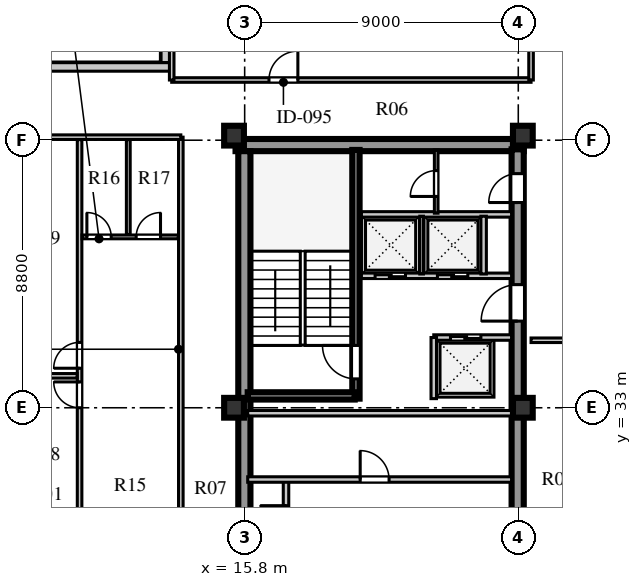
"""IFC4 building model, lengths in metres.
Left out: names, types, materials, properties, quantities, classifications, styles, units other than length and angle.
Written with IfcOpenShell. Run it as: python <this file> out.ifc"""

import sys

from ifc_helpers import new_model, si_unit, direction, frame, frame_2d, origin, origin_2d, place, context, subcontext, project, spatial, rectangle, extrude, element, fill, save


model = new_model("IFC4")
c1 = context("Model", 3, precision=1e-05, world=origin(), true_north=direction((0.0, 1.0)))
c2 = subcontext(c1, "Body", "Model", "MODEL_VIEW")
j1 = project(units=[si_unit("LENGTHUNIT", "METRE"), si_unit("PLANEANGLEUNIT", "RADIAN")], contexts=[c1])
p1 = place(None, origin())
s1 = spatial("IfcSite", under=j1, at=p1, CompositionType="ELEMENT")
p2 = place(p1, origin())
s2 = spatial("IfcBuilding", under=s1, at=p2, CompositionType="ELEMENT")
p3 = place(p2, frame((0.0, 0.0, 237.5)))
s3 = spatial("IfcBuildingStorey", under=s2, at=p3, CompositionType="ELEMENT", Elevation=237.5)
p4 = place(p3, frame((15.5, 41.64, 0.0), z_axis=(0.0, 0.0, 1.0), x_axis=(1.0, 0.0, 0.0)))
e1 = element("IfcWall", 1, at=p4, inside=s3, PredefinedType="SHEAR", context=c2, shape_type="SweptSolid", body=[
    extrude(rectangle(XDim=9.48, YDim=0.4, at=frame_2d((4.74, 0.0))), origin(), (0.0, 0.0, 1.0), 3.66),
])
p5 = place(p3, frame((15.79, 15.81, 0.0), z_axis=(0.0, 0.0, 1.0), x_axis=(0.0, 1.0, 0.0)))
e2 = element("IfcWall", 2, at=p5, inside=s3, PredefinedType="SHEAR", context=c2, shape_type="SweptSolid", body=[
    extrude(rectangle(XDim=25.63, YDim=0.4, at=frame_2d((12.815, 0.0))), origin(), (0.0, 0.0, 1.0), 3.66),
])
p6 = place(p3, frame((24.78, 15.74, 0.0), z_axis=(0.0, 0.0, 1.0), x_axis=(0.0, 1.0, 0.0)))
e3 = element("IfcWall", 3, at=p6, inside=s3, PredefinedType="SHEAR", context=c2, shape_type="SweptSolid", body=[
    extrude(rectangle(XDim=25.76, YDim=0.4, at=frame_2d((12.88, 0.0))), origin(), (0.0, 0.0, 1.0), 3.66),
])
p7 = place(p6, frame((1.61, 0.0, 0.0)))
e4 = element("IfcOpeningElement", 4, at=p7, cuts=e3, PredefinedType="OPENING", context=c2, shape_type="SweptSolid", body=[
    extrude(rectangle(XDim=1.2, YDim=2.1, at=frame_2d((0.6, 1.05))), frame((0.0, 0.21, 0.0), z_axis=(0.0, -1.0, 0.0), x_axis=(1.0, 0.0, 0.0)), (0.0, 0.0, 1.0), 0.42),
])
p8 = place(p6, frame((6.78, 0.0, 0.0)))
e5 = element("IfcOpeningElement", 5, at=p8, cuts=e3, PredefinedType="OPENING", context=c2, shape_type="SweptSolid", body=[
    extrude(rectangle(XDim=0.85, YDim=2.06, at=frame_2d((0.425, 1.03))), frame((0.0, 0.21, 0.0), z_axis=(0.0, -1.0, 0.0), x_axis=(1.0, 0.0, 0.0)), (0.0, 0.0, 1.0), 0.42),
])
p9 = place(p6, frame((12.11, 0.0, 0.0)))
e6 = element("IfcOpeningElement", 6, at=p9, cuts=e3, PredefinedType="OPENING", context=c2, shape_type="SweptSolid", body=[
    extrude(rectangle(XDim=1.5, YDim=2.12, at=frame_2d((0.75, 1.06))), frame((0.0, 0.21, 0.0), z_axis=(0.0, -1.0, 0.0), x_axis=(1.0, 0.0, 0.0)), (0.0, 0.0, 1.0), 0.42),
])
p10 = place(p6, frame((20.11, 0.0, 0.0)))
e7 = element("IfcOpeningElement", 7, at=p10, cuts=e3, PredefinedType="OPENING", context=c2, shape_type="SweptSolid", body=[
    extrude(rectangle(XDim=1.2, YDim=2.12, at=frame_2d((0.6, 1.06))), frame((0.0, 0.21, 0.0), z_axis=(0.0, -1.0, 0.0), x_axis=(1.0, 0.0, 0.0)), (0.0, 0.0, 1.0), 0.42),
])
p11 = place(p6, frame((24.01, 0.0, 0.0)))
e8 = element("IfcOpeningElement", 8, at=p11, cuts=e3, PredefinedType="OPENING", context=c2, shape_type="SweptSolid", body=[
    extrude(rectangle(XDim=0.95, YDim=2.1, at=frame_2d((0.475, 1.05))), frame((0.0, 0.21, 0.0), z_axis=(0.0, -1.0, 0.0), x_axis=(1.0, 0.0, 0.0)), (0.0, 0.0, 1.0), 0.42),
])
for number, where, z_axis, x_axis in (
    (9, (15.45, 33.0, 0.0), (0.0, 0.0, 1.0), (1.0, 0.0, 0.0)),
    (10, (15.45, 41.95, 0.0), (0.0, 0.0, 1.0), (1.0, 0.0, 0.0)),
    (11, (24.95, 33.0, 0.0), (0.0, 0.0, 1.0), (1.0, 0.0, 0.0)),
    (12, (24.95, 41.95, 0.0), (0.0, 0.0, 1.0), (1.0, 0.0, 0.0)),
):
    element("IfcColumn", number, at=place(p3, frame(where, z_axis=z_axis, x_axis=x_axis)), inside=s3, PredefinedType="COLUMN", context=c2, shape_type="SweptSolid", body=[
        extrude(rectangle(XDim=0.65, YDim=0.65, at=origin_2d()), origin(), (0.0, 0.0, 1.0), 3.66),
    ])
p12 = place(p3, frame((13.19, 49.32, 0.0), z_axis=(0.0, 0.0, 1.0), x_axis=(0.0, -1.0, 0.0)))
e13 = element("IfcWall", 13, at=p12, inside=s3, PredefinedType="STANDARD", context=c2, shape_type="SweptSolid", body=[
    extrude(rectangle(XDim=4.97, YDim=0.28, at=frame_2d((2.485, 0.0))), origin(), (0.0, 0.0, 1.0), 3.66),
])
p13 = place(p3, frame((13.33, 44.21, 0.0), z_axis=(0.0, 0.0, 1.0), x_axis=(-1.0, 0.0, 0.0)))
e14 = element("IfcWall", 14, at=p13, inside=s3, PredefinedType="STANDARD", context=c2, shape_type="SweptSolid", body=[
    extrude(rectangle(XDim=5.53, YDim=0.28, at=frame_2d((2.765, 0.0))), origin(), (0.0, 0.0, 1.0), 3.66),
])
p14 = place(p3, frame((17.16, 26.58, 0.0), z_axis=(0.0, 0.0, 1.0), x_axis=(0.0, 1.0, 0.0)))
e15 = element("IfcWall", 15, at=p14, inside=s3, PredefinedType="SOLIDWALL", context=c2, shape_type="SweptSolid", body=[
    extrude(rectangle(XDim=4.02, YDim=0.18, at=frame_2d((2.01, 0.0))), origin(), (0.0, 0.0, 1.0), 3.66),
])
p15 = place(p14, frame((2.35, 0.0, 0.0)))
e16 = element("IfcOpeningElement", 16, at=p15, cuts=e15, PredefinedType="OPENING", context=c2, shape_type="SweptSolid", body=[
    extrude(rectangle(XDim=0.85, YDim=2.06, at=frame_2d((0.425, 1.03))), frame((0.0, 0.1, 0.0), z_axis=(0.0, -1.0, 0.0), x_axis=(1.0, 0.0, 0.0)), (0.0, 0.0, 1.0), 0.2),
])
p16 = place(p3, frame((15.9, 30.64, 0.0), z_axis=(0.0, 0.0, 1.0), x_axis=(1.0, 0.0, 0.0)))
e17 = element("IfcWall", 17, at=p16, inside=s3, PredefinedType="SOLIDWALL", context=c2, shape_type="SweptSolid", body=[
    extrude(rectangle(XDim=8.68, YDim=0.18, at=frame_2d((4.34, 0.0))), origin(), (0.0, 0.0, 1.0), 3.66),
])
p17 = place(p16, frame((3.7, 0.0, 0.0)))
e18 = element("IfcOpeningElement", 18, at=p17, cuts=e17, PredefinedType="OPENING", context=c2, shape_type="SweptSolid", body=[
    extrude(rectangle(XDim=0.95, YDim=2.1, at=frame_2d((0.475, 1.05))), frame((0.0, 0.1, 0.0), z_axis=(0.0, -1.0, 0.0), x_axis=(1.0, 0.0, 0.0)), (0.0, 0.0, 1.0), 0.2),
])
p18 = place(p3, frame((15.9, 32.82, 0.0), z_axis=(0.0, 0.0, 1.0), x_axis=(1.0, 0.0, 0.0)))
e19 = element("IfcWall", 19, at=p18, inside=s3, PredefinedType="SOLIDWALL", context=c2, shape_type="SweptSolid", body=[
    extrude(rectangle(XDim=8.68, YDim=0.18, at=frame_2d((4.34, 0.0))), origin(), (0.0, 0.0, 1.0), 3.06),
])
p19 = place(p3, frame((19.46, 33.3, 0.0), z_axis=(0.0, 0.0, 1.0), x_axis=(0.0, 1.0, 0.0)))
e20 = element("IfcWall", 20, at=p19, inside=s3, PredefinedType="SHEAR", context=c2, shape_type="SweptSolid", body=[
    extrude(rectangle(XDim=8.18, YDim=0.24, at=frame_2d((4.09, 0.0))), origin(), (0.0, 0.0, 1.0), 3.9),
])
p20 = place(p19, frame((0.65, 0.0, 0.0)))
e21 = element("IfcOpeningElement", 21, at=p20, cuts=e20, PredefinedType="OPENING", context=c2, shape_type="SweptSolid", body=[
    extrude(rectangle(XDim=1.1, YDim=2.1, at=frame_2d((0.55, 1.05))), frame((0.0, 0.13, 0.0), z_axis=(0.0, -1.0, 0.0), x_axis=(1.0, 0.0, 0.0)), (0.0, 0.0, 1.0), 0.26),
])
p21 = place(p3, frame((15.9, 33.39, 0.0), z_axis=(0.0, 0.0, 1.0), x_axis=(1.0, 0.0, 0.0)))
e22 = element("IfcWall", 22, at=p21, inside=s3, PredefinedType="SHEAR", context=c2, shape_type="SweptSolid", body=[
    extrude(rectangle(XDim=3.52, YDim=0.24, at=frame_2d((1.76, 0.0))), origin(), (0.0, 0.0, 1.0), 3.9),
])
p22 = place(p3, frame((22.02, 35.31, 0.0), z_axis=(0.0, 0.0, 1.0), x_axis=(1.0, 0.0, 0.0)))
e23 = element("IfcWall", 23, at=p22, inside=s3, PredefinedType="SOLIDWALL", context=c2, shape_type="SweptSolid", body=[
    extrude(rectangle(XDim=2.56, YDim=0.18, at=frame_2d((1.28, 0.0))), origin(), (0.0, 0.0, 1.0), 3.66),
])
p23 = place(p22, frame((0.55, 0.0, 0.0)))
e24 = element("IfcOpeningElement", 24, at=p23, cuts=e23, PredefinedType="OPENING", context=c2, shape_type="SweptSolid", body=[
    extrude(rectangle(XDim=1.0, YDim=2.1, at=frame_2d((0.5, 1.05))), frame((0.0, 0.1, 0.0), z_axis=(0.0, -1.0, 0.0), x_axis=(1.0, 0.0, 0.0)), (0.0, 0.0, 1.0), 0.2),
])
p24 = place(p3, frame((22.02, 33.3, 0.0), z_axis=(0.0, 0.0, 1.0), x_axis=(0.0, 1.0, 0.0)))
e25 = element("IfcWall", 25, at=p24, inside=s3, PredefinedType="SOLIDWALL", context=c2, shape_type="SweptSolid", body=[
    extrude(rectangle(XDim=2.01, YDim=0.18, at=frame_2d((1.005, 0.0))), origin(), (0.0, 0.0, 1.0), 3.66),
])
p25 = place(p3, frame((19.64, 37.34, 0.0), z_axis=(0.0, 0.0, 1.0), x_axis=(1.0, 0.0, 0.0)))
e26 = element("IfcWall", 26, at=p25, inside=s3, PredefinedType="SOLIDWALL", context=c2, shape_type="SweptSolid", body=[
    extrude(rectangle(XDim=4.94, YDim=0.18, at=frame_2d((2.47, 0.0))), origin(), (0.0, 0.0, 1.0), 3.66),
])
p26 = place(p25, frame((0.45, 0.0, 0.0)))
e27 = element("IfcOpeningElement", 27, at=p26, cuts=e26, PredefinedType="OPENING", context=c2, shape_type="SweptSolid", body=[
    extrude(rectangle(XDim=1.0, YDim=2.1, at=frame_2d((0.5, 1.05))), frame((0.0, 0.1, 0.0), z_axis=(0.0, -1.0, 0.0), x_axis=(1.0, 0.0, 0.0)), (0.0, 0.0, 1.0), 0.2),
])
p27 = place(p25, frame((2.5, 0.0, 0.0)))
e28 = element("IfcOpeningElement", 28, at=p27, cuts=e26, PredefinedType="OPENING", context=c2, shape_type="SweptSolid", body=[
    extrude(rectangle(XDim=1.0, YDim=2.1, at=frame_2d((0.5, 1.05))), frame((0.0, 0.1, 0.0), z_axis=(0.0, -1.0, 0.0), x_axis=(1.0, 0.0, 0.0)), (0.0, 0.0, 1.0), 0.2),
])
p28 = place(p3, frame((19.64, 39.36, 0.0), z_axis=(0.0, 0.0, 1.0), x_axis=(1.0, 0.0, 0.0)))
e29 = element("IfcWall", 29, at=p28, inside=s3, PredefinedType="SOLIDWALL", context=c2, shape_type="SweptSolid", body=[
    extrude(rectangle(XDim=4.94, YDim=0.18, at=frame_2d((2.47, 0.0))), origin(), (0.0, 0.0, 1.0), 3.66),
])
p29 = place(p3, frame((21.62, 37.4, 0.0), z_axis=(0.0, 0.0, 1.0), x_axis=(0.0, 1.0, 0.0)))
e30 = element("IfcWall", 30, at=p29, inside=s3, PredefinedType="PARTITIONING", context=c2, shape_type="SweptSolid", body=[
    extrude(rectangle(XDim=1.9, YDim=0.12, at=frame_2d((0.95, 0.0))), origin(), (0.0, 0.0, 1.0), 3.66),
])
p30 = place(p3, frame((23.66, 37.4, 0.0), z_axis=(0.0, 0.0, 1.0), x_axis=(0.0, 1.0, 0.0)))
e31 = element("IfcWall", 31, at=p30, inside=s3, PredefinedType="SOLIDWALL", context=c2, shape_type="SweptSolid", body=[
    extrude(rectangle(XDim=1.9, YDim=0.18, at=frame_2d((0.95, 0.0))), origin(), (0.0, 0.0, 1.0), 3.66),
])
p31 = place(p3, frame((22.1, 39.4, 0.0), z_axis=(0.0, 0.0, 1.0), x_axis=(0.0, 1.0, 0.0)))
e32 = element("IfcWall", 32, at=p31, inside=s3, PredefinedType="PARTITIONING", context=c2, shape_type="SweptSolid", body=[
    extrude(rectangle(XDim=2.08, YDim=0.12, at=frame_2d((1.04, 0.0))), origin(), (0.0, 0.0, 1.0), 3.66),
])
p32 = place(p31, frame((0.55, 0.0, 0.0)))
e33 = element("IfcOpeningElement", 33, at=p32, cuts=e32, PredefinedType="OPENING", context=c2, shape_type="SweptSolid", body=[
    extrude(rectangle(XDim=0.85, YDim=2.06, at=frame_2d((0.425, 1.03))), frame((0.0, 0.07, 0.0), z_axis=(0.0, -1.0, 0.0), x_axis=(1.0, 0.0, 0.0)), (0.0, 0.0, 1.0), 0.14),
])
p33 = place(p3, frame((25.22, 35.22, 0.0), z_axis=(0.0, 0.0, 1.0), x_axis=(1.0, 0.0, 0.0)))
e34 = element("IfcWall", 34, at=p33, inside=s3, PredefinedType="PARTITIONING", context=c2, shape_type="SweptSolid", body=[
    extrude(rectangle(XDim=9.5, YDim=0.15, at=frame_2d((4.75, 0.0))), origin(), (0.0, 0.0, 1.0), 3.66),
])
p34 = place(p33, frame((1.8, 0.0, 0.0)))
e35 = element("IfcOpeningElement", 35, at=p34, cuts=e34, PredefinedType="OPENING", context=c2, shape_type="SweptSolid", body=[
    extrude(rectangle(XDim=1.1, YDim=2.08, at=frame_2d((0.55, 1.04))), frame((0.0, 0.085, 0.0), z_axis=(0.0, -1.0, 0.0), x_axis=(1.0, 0.0, 0.0)), (0.0, 0.0, 1.0), 0.17),
])
p35 = place(p3, frame((13.4, 43.78, 0.0), z_axis=(0.0, 0.0, 1.0), x_axis=(1.0, 0.0, 0.0)))
e36 = element("IfcWall", 36, at=p35, inside=s3, PredefinedType="PARTITIONING", context=c2, shape_type="SweptSolid", body=[
    extrude(rectangle(XDim=11.82, YDim=0.15, at=frame_2d((5.91, 0.0))), origin(), (0.0, 0.0, 1.0), 3.66),
])
p36 = place(p35, frame((3.2, 0.0, 0.0)))
e37 = element("IfcOpeningElement", 37, at=p36, cuts=e36, PredefinedType="OPENING", context=c2, shape_type="SweptSolid", body=[
    extrude(rectangle(XDim=0.95, YDim=2.08, at=frame_2d((0.475, 1.04))), frame((0.0, 0.085, 0.0), z_axis=(0.0, -1.0, 0.0), x_axis=(1.0, 0.0, 0.0)), (0.0, 0.0, 1.0), 0.17),
])
p37 = place(p3, frame((13.4, 43.78, 0.0), z_axis=(0.0, 0.0, 1.0), x_axis=(0.0, 1.0, 0.0)))
e38 = element("IfcWall", 38, at=p37, inside=s3, PredefinedType="PARTITIONING", context=c2, shape_type="SweptSolid", body=[
    extrude(rectangle(XDim=5.54, YDim=0.15, at=frame_2d((2.77, 0.0))), origin(), (0.0, 0.0, 1.0), 3.66),
])
p38 = place(p3, frame((25.22, 43.78, 0.0), z_axis=(0.0, 0.0, 1.0), x_axis=(0.0, 1.0, 0.0)))
e39 = element("IfcWall", 39, at=p38, inside=s3, PredefinedType="PARTITIONING", context=c2, shape_type="SweptSolid", body=[
    extrude(rectangle(XDim=5.54, YDim=0.15, at=frame_2d((2.77, 0.0))), origin(), (0.0, 0.0, 1.0), 3.21),
])
p39 = place(p3, frame((13.7, 15.3, 0.0), z_axis=(0.0, 0.0, 1.0), x_axis=(0.0, 1.0, 0.0)))
e40 = element("IfcWall", 40, at=p39, inside=s3, PredefinedType="PARTITIONING", context=c2, shape_type="SweptSolid", body=[
    extrude(rectangle(XDim=26.6, YDim=0.15, at=frame_2d((13.3, 0.0))), origin(), (0.0, 0.0, 1.0), 3.66),
])
p40 = place(p39, frame((0.65, 0.0, 0.0)))
e41 = element("IfcOpeningElement", 41, at=p40, cuts=e40, PredefinedType="OPENING", context=c2, shape_type="SweptSolid", body=[
    extrude(rectangle(XDim=0.95, YDim=2.1, at=frame_2d((0.475, 1.05))), frame((0.0, 0.085, 0.0), z_axis=(0.0, -1.0, 0.0), x_axis=(1.0, 0.0, 0.0)), (0.0, 0.0, 1.0), 0.17),
])
p41 = place(p39, frame((11.55, 0.0, 0.0)))
e42 = element("IfcOpeningElement", 42, at=p41, cuts=e40, PredefinedType="OPENING", context=c2, shape_type="SweptSolid", body=[
    extrude(rectangle(XDim=0.95, YDim=2.1, at=frame_2d((0.475, 1.05))), frame((0.0, 0.085, 0.0), z_axis=(0.0, -1.0, 0.0), x_axis=(1.0, 0.0, 0.0)), (0.0, 0.0, 1.0), 0.17),
])
p42 = place(p3, frame((8.08, 41.9, 0.0), z_axis=(0.0, 0.0, 1.0), x_axis=(1.0, 0.0, 0.0)))
e43 = element("IfcWall", 43, at=p42, inside=s3, PredefinedType="PARTITIONING", context=c2, shape_type="SweptSolid", body=[
    extrude(rectangle(XDim=5.62, YDim=0.15, at=frame_2d((2.81, 0.0))), origin(), (0.0, 0.0, 1.0), 3.21),
])
p43 = place(p3, frame((10.37, 26.28, 0.0), z_axis=(0.0, 0.0, 1.0), x_axis=(0.0, 1.0, 0.0)))
e44 = element("IfcWall", 44, at=p43, inside=s3, PredefinedType="PARTITIONING", context=c2, shape_type="SweptSolid", body=[
    extrude(rectangle(XDim=15.54, YDim=0.15, at=frame_2d((7.77, 0.0))), origin(), (0.0, 0.0, 1.0), 3.66),
])
p44 = place(p43, frame((6.72, 0.0, 0.0)))
e45 = element("IfcOpeningElement", 45, at=p44, cuts=e44, PredefinedType="OPENING", context=c2, shape_type="SweptSolid", body=[
    extrude(rectangle(XDim=0.85, YDim=2.08, at=frame_2d((0.425, 1.04))), frame((0.0, 0.085, 0.0), z_axis=(0.0, -1.0, 0.0), x_axis=(1.0, 0.0, 0.0)), (0.0, 0.0, 1.0), 0.17),
])
p45 = place(p43, frame((8.02, 0.0, 0.0)))
e46 = element("IfcOpeningElement", 46, at=p45, cuts=e44, PredefinedType="OPENING", context=c2, shape_type="SweptSolid", body=[
    extrude(rectangle(XDim=0.85, YDim=2.08, at=frame_2d((0.425, 1.04))), frame((0.0, 0.085, 0.0), z_axis=(0.0, -1.0, 0.0), x_axis=(1.0, 0.0, 0.0)), (0.0, 0.0, 1.0), 0.17),
])
p46 = place(p3, frame((10.45, 38.62, 0.0), z_axis=(0.0, 0.0, 1.0), x_axis=(1.0, 0.0, 0.0)))
e47 = element("IfcWall", 47, at=p46, inside=s3, PredefinedType="PLUMBINGWALL", context=c2, shape_type="SweptSolid", body=[
    extrude(rectangle(XDim=3.17, YDim=0.125, at=frame_2d((1.585, 0.0))), origin(), (0.0, 0.0, 1.0), 3.66),
])
p47 = place(p46, frame((0.16, 0.0, 0.0)))
e48 = element("IfcOpeningElement", 48, at=p47, cuts=e47, PredefinedType="OPENING", context=c2, shape_type="SweptSolid", body=[
    extrude(rectangle(XDim=0.8, YDim=2.05, at=frame_2d((0.4, 1.025))), frame((0.0, 0.073, 0.0), z_axis=(0.0, -1.0, 0.0), x_axis=(1.0, 0.0, 0.0)), (0.0, 0.0, 1.0), 0.145),
])
p48 = place(p46, frame((1.782, 0.0, 0.0)))
e49 = element("IfcOpeningElement", 49, at=p48, cuts=e47, PredefinedType="OPENING", context=c2, shape_type="SweptSolid", body=[
    extrude(rectangle(XDim=0.8, YDim=2.05, at=frame_2d((0.4, 1.025))), frame((0.0, 0.073, 0.0), z_axis=(0.0, -1.0, 0.0), x_axis=(1.0, 0.0, 0.0)), (0.0, 0.0, 1.0), 0.145),
])
p49 = place(p3, frame((11.972, 38.7, 0.0), z_axis=(0.0, 0.0, 1.0), x_axis=(0.0, 1.0, 0.0)))
e50 = element("IfcWall", 50, at=p49, inside=s3, PredefinedType="PLUMBINGWALL", context=c2, shape_type="SweptSolid", body=[
    extrude(rectangle(XDim=3.12, YDim=0.125, at=frame_2d((1.56, 0.0))), origin(), (0.0, 0.0, 1.0), 3.66),
])
p50 = place(p3, frame((8.08, 34.05, 0.0), z_axis=(0.0, 0.0, 1.0), x_axis=(1.0, 0.0, 0.0)))
e51 = element("IfcWall", 51, at=p50, inside=s3, PredefinedType="PARTITIONING", context=c2, shape_type="SweptSolid", body=[
    extrude(rectangle(XDim=2.21, YDim=0.15, at=frame_2d((1.105, 0.0))), origin(), (0.0, 0.0, 1.0), 3.66),
])
p51 = place(p15, origin())
e52 = element("IfcDoor", 52, at=p51, inside=s3, OperationType="SINGLE_SWING_RIGHT", PredefinedType="DOOR", context=c2, shape_type="SweptSolid", body=[
    extrude(rectangle(XDim=0.85, YDim=2.06, at=frame_2d((0.425, 1.03))), frame((0.0, 0.025, 0.0), z_axis=(0.0, -1.0, 0.0), x_axis=(1.0, 0.0, 0.0)), (0.0, 0.0, 1.0), 0.05),
])
fill(e16, e52)
p52 = place(p17, frame((0.95, 0.0, 0.0), z_axis=(0.0, 0.0, 1.0), x_axis=(-1.0, 0.0, 0.0)))
e53 = element("IfcDoor", 53, at=p52, inside=s3, OperationType="SINGLE_SWING_RIGHT", PredefinedType="DOOR", context=c2, shape_type="SweptSolid", body=[
    extrude(rectangle(XDim=0.95, YDim=2.1, at=frame_2d((0.475, 1.05))), frame((0.0, 0.025, 0.0), z_axis=(0.0, -1.0, 0.0), x_axis=(1.0, 0.0, 0.0)), (0.0, 0.0, 1.0), 0.05),
])
fill(e18, e53)
p53 = place(p20, origin())
e54 = element("IfcDoor", 54, at=p53, inside=s3, OperationType="SINGLE_SWING_RIGHT", PredefinedType="DOOR", context=c2, shape_type="SweptSolid", body=[
    extrude(rectangle(XDim=1.1, YDim=2.1, at=frame_2d((0.55, 1.05))), frame((0.0, 0.025, 0.0), z_axis=(0.0, -1.0, 0.0), x_axis=(1.0, 0.0, 0.0)), (0.0, 0.0, 1.0), 0.05),
])
fill(e21, e54)
p54 = place(p10, frame((1.2, 0.0, 0.0), z_axis=(0.0, 0.0, 1.0), x_axis=(-1.0, 0.0, 0.0)))
e55 = element("IfcDoor", 55, at=p54, inside=s3, OperationType="SINGLE_SWING_RIGHT", PredefinedType="DOOR", context=c2, shape_type="SweptSolid", body=[
    extrude(rectangle(XDim=1.2, YDim=2.12, at=frame_2d((0.6, 1.06))), frame((0.0, 0.025, 0.0), z_axis=(0.0, -1.0, 0.0), x_axis=(1.0, 0.0, 0.0)), (0.0, 0.0, 1.0), 0.05),
])
fill(e7, e55)
p55 = place(p26, frame((1.0, 0.0, 0.0), z_axis=(0.0, 0.0, 1.0), x_axis=(-1.0, 0.0, 0.0)))
e56 = element("IfcDoor", 56, at=p55, inside=s3, OperationType="DOUBLE_DOOR_SLIDING", PredefinedType="DOOR", context=c2, shape_type="SweptSolid", body=[
    extrude(rectangle(XDim=1.0, YDim=2.1, at=frame_2d((0.5, 1.05))), frame((0.0, 0.025, 0.0), z_axis=(0.0, -1.0, 0.0), x_axis=(1.0, 0.0, 0.0)), (0.0, 0.0, 1.0), 0.05),
])
fill(e27, e56)
p56 = place(p27, frame((1.0, 0.0, 0.0), z_axis=(0.0, 0.0, 1.0), x_axis=(-1.0, 0.0, 0.0)))
e57 = element("IfcDoor", 57, at=p56, inside=s3, OperationType="DOUBLE_DOOR_SLIDING", PredefinedType="DOOR", context=c2, shape_type="SweptSolid", body=[
    extrude(rectangle(XDim=1.0, YDim=2.1, at=frame_2d((0.5, 1.05))), frame((0.0, 0.025, 0.0), z_axis=(0.0, -1.0, 0.0), x_axis=(1.0, 0.0, 0.0)), (0.0, 0.0, 1.0), 0.05),
])
fill(e28, e57)
p57 = place(p23, origin())
e58 = element("IfcDoor", 58, at=p57, inside=s3, OperationType="DOUBLE_DOOR_SLIDING", PredefinedType="DOOR", context=c2, shape_type="SweptSolid", body=[
    extrude(rectangle(XDim=1.0, YDim=2.1, at=frame_2d((0.5, 1.05))), frame((0.0, 0.025, 0.0), z_axis=(0.0, -1.0, 0.0), x_axis=(1.0, 0.0, 0.0)), (0.0, 0.0, 1.0), 0.05),
])
fill(e24, e58)
p58 = place(p32, origin())
e59 = element("IfcDoor", 59, at=p58, inside=s3, OperationType="SINGLE_SWING_LEFT", PredefinedType="DOOR", context=c2, shape_type="SweptSolid", body=[
    extrude(rectangle(XDim=0.85, YDim=2.06, at=frame_2d((0.425, 1.03))), frame((0.0, 0.025, 0.0), z_axis=(0.0, -1.0, 0.0), x_axis=(1.0, 0.0, 0.0)), (0.0, 0.0, 1.0), 0.05),
])
fill(e33, e59)
p59 = place(p11, frame((0.95, 0.0, 0.0), z_axis=(0.0, 0.0, 1.0), x_axis=(-1.0, 0.0, 0.0)))
e60 = element("IfcDoor", 60, at=p59, inside=s3, OperationType="SINGLE_SWING_RIGHT", PredefinedType="DOOR", context=c2, shape_type="SweptSolid", body=[
    extrude(rectangle(XDim=0.95, YDim=2.1, at=frame_2d((0.475, 1.05))), frame((0.0, 0.025, 0.0), z_axis=(0.0, -1.0, 0.0), x_axis=(1.0, 0.0, 0.0)), (0.0, 0.0, 1.0), 0.05),
])
fill(e8, e60)
p60 = place(p36, origin())
e61 = element("IfcDoor", 61, at=p60, inside=s3, OperationType="SINGLE_SWING_RIGHT", PredefinedType="DOOR", context=c2, shape_type="SweptSolid", body=[
    extrude(rectangle(XDim=0.95, YDim=2.08, at=frame_2d((0.475, 1.04))), frame((0.0, 0.025, 0.0), z_axis=(0.0, -1.0, 0.0), x_axis=(1.0, 0.0, 0.0)), (0.0, 0.0, 1.0), 0.05),
])
fill(e37, e61)
p61 = place(p47, origin())
e62 = element("IfcDoor", 62, at=p61, inside=s3, OperationType="SINGLE_SWING_LEFT", PredefinedType="DOOR", context=c2, shape_type="SweptSolid", body=[
    extrude(rectangle(XDim=0.8, YDim=2.05, at=frame_2d((0.4, 1.025))), frame((0.0, 0.025, 0.0), z_axis=(0.0, -1.0, 0.0), x_axis=(1.0, 0.0, 0.0)), (0.0, 0.0, 1.0), 0.05),
])
fill(e48, e62)
p62 = place(p48, origin())
e63 = element("IfcDoor", 63, at=p62, inside=s3, OperationType="SINGLE_SWING_RIGHT", PredefinedType="DOOR", context=c2, shape_type="SweptSolid", body=[
    extrude(rectangle(XDim=0.8, YDim=2.05, at=frame_2d((0.4, 1.025))), frame((0.0, 0.025, 0.0), z_axis=(0.0, -1.0, 0.0), x_axis=(1.0, 0.0, 0.0)), (0.0, 0.0, 1.0), 0.05),
])
fill(e49, e63)
p63 = place(p44, frame((0.85, 0.0, 0.0), z_axis=(0.0, 0.0, 1.0), x_axis=(-1.0, 0.0, 0.0)))
e64 = element("IfcDoor", 64, at=p63, inside=s3, OperationType="SINGLE_SWING_LEFT", PredefinedType="DOOR", context=c2, shape_type="SweptSolid", body=[
    extrude(rectangle(XDim=0.85, YDim=2.08, at=frame_2d((0.425, 1.04))), frame((0.0, 0.025, 0.0), z_axis=(0.0, -1.0, 0.0), x_axis=(1.0, 0.0, 0.0)), (0.0, 0.0, 1.0), 0.05),
])
fill(e45, e64)
p64 = place(p45, frame((0.85, 0.0, 0.0), z_axis=(0.0, 0.0, 1.0), x_axis=(-1.0, 0.0, 0.0)))
e65 = element("IfcDoor", 65, at=p64, inside=s3, OperationType="SINGLE_SWING_RIGHT", PredefinedType="DOOR", context=c2, shape_type="SweptSolid", body=[
    extrude(rectangle(XDim=0.85, YDim=2.08, at=frame_2d((0.425, 1.04))), frame((0.0, 0.025, 0.0), z_axis=(0.0, -1.0, 0.0), x_axis=(1.0, 0.0, 0.0)), (0.0, 0.0, 1.0), 0.05),
])
fill(e46, e65)
save(model, sys.argv[1])
